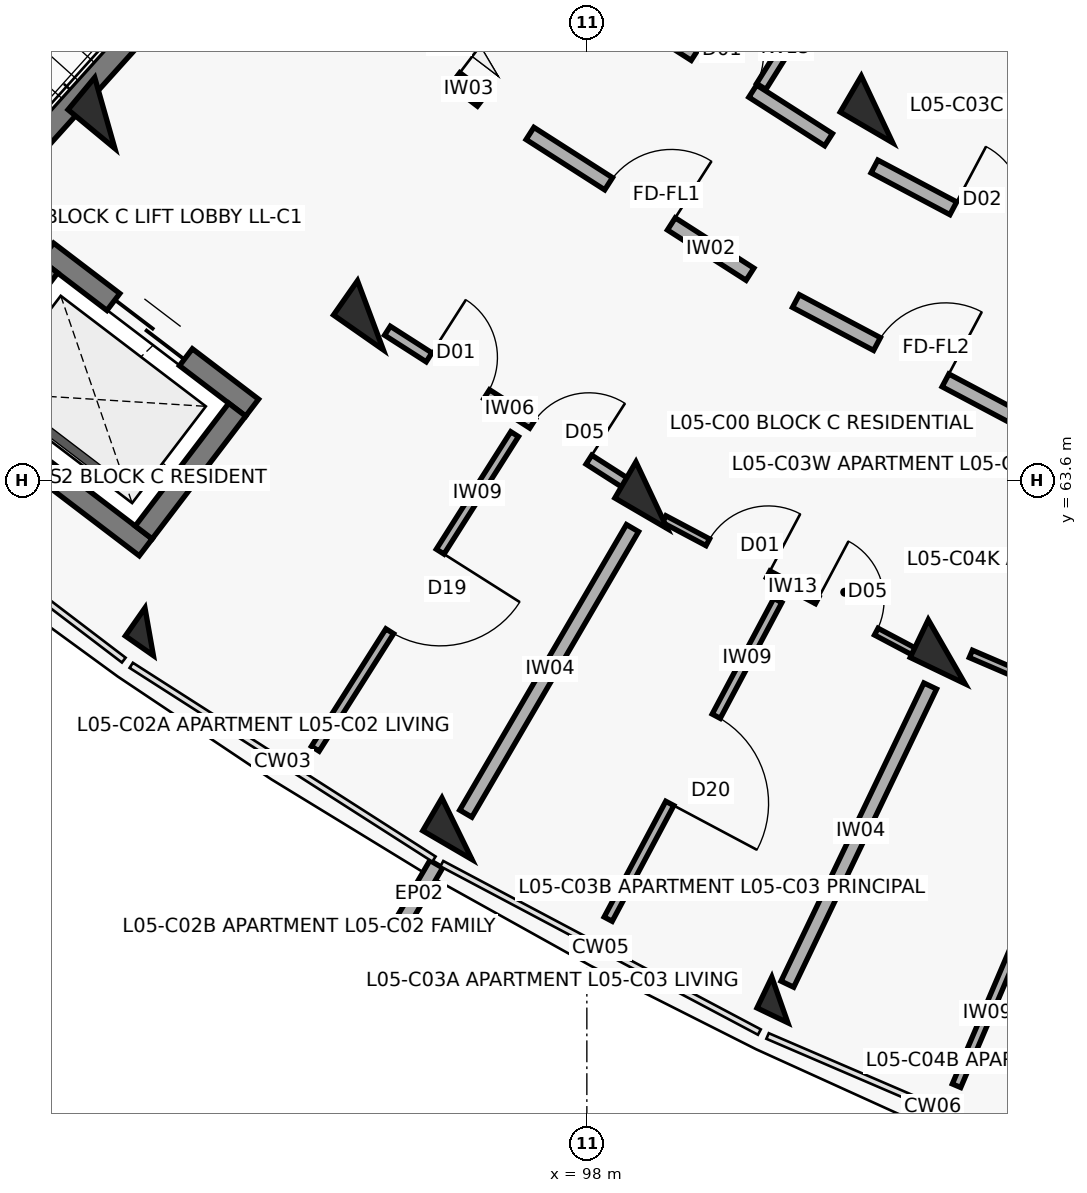
"""IFC4 building model, lengths in metres.
Left out: names, types, materials, properties, quantities, classifications, styles, units other than length and angle.
Written with IfcOpenShell. Run it as: python <this file> out.ifc"""

import sys

from ifc_helpers import new_model, si_unit, direction, frame, frame_2d, origin, origin_2d, place, context, subcontext, project, spatial, rectangle, extrude, element, fill, save


model = new_model("IFC4")
c1 = context("Model", 3, precision=1e-05, world=origin(), true_north=direction((0.0, 1.0)))
c2 = subcontext(c1, "Body", "Model", "MODEL_VIEW")
j1 = project(units=[si_unit("LENGTHUNIT", "METRE"), si_unit("PLANEANGLEUNIT", "RADIAN")], contexts=[c1])
p1 = place(None, origin())
s1 = spatial("IfcSite", under=j1, at=p1, CompositionType="ELEMENT")
p2 = place(p1, origin())
s2 = spatial("IfcBuilding", under=s1, at=p2, CompositionType="ELEMENT")
p3 = place(p2, frame((0.0, 0.0, 17.4)))
s3 = spatial("IfcBuildingStorey", under=s2, at=p3, CompositionType="ELEMENT", Elevation=17.4)
for number, where, z_axis, x_axis in (
    (1, (91.658, 68.43, 0.0), (0.0, 0.0, 1.0), (-0.638, -0.77, 0.0)),
    (2, (95.152, 65.768, 0.0), (0.0, 0.0, 1.0), (-0.573, -0.82, 0.0)),
):
    element("IfcColumn", number, at=place(p3, frame(where, z_axis=z_axis, x_axis=x_axis)), inside=s3, PredefinedType="COLUMN", context=c2, shape_type="SweptSolid", body=[
        extrude(rectangle(XDim=0.55, YDim=0.8, at=origin_2d()), origin(), (0.0, 0.0, 1.0), 3.1),
    ])
p4 = place(p3, frame((92.241, 61.605, 0.0), z_axis=(0.0, 0.0, 1.0), x_axis=(-0.573004420611, -0.819552276527, 0.0)))
e3 = element("IfcColumn", 3, at=p4, inside=s3, PredefinedType="COLUMN", context=c2, shape_type="SweptSolid", body=[
    extrude(rectangle(XDim=0.45, YDim=0.45, at=origin_2d()), origin(), (0.0, 0.0, 1.0), 3.1),
])
for number, where, z_axis, x_axis in (
    (4, (101.817, 68.478, 0.0), (0.0, 0.0, 1.0), (-0.504, -0.864, 0.0)),
    (5, (98.853, 63.4, 0.0), (0.0, 0.0, 1.0), (-0.504, -0.864, 0.0)),
):
    element("IfcColumn", number, at=place(p3, frame(where, z_axis=z_axis, x_axis=x_axis)), inside=s3, PredefinedType="COLUMN", context=c2, shape_type="SweptSolid", body=[
        extrude(rectangle(XDim=0.55, YDim=0.8, at=origin_2d()), origin(), (0.0, 0.0, 1.0), 3.1),
    ])
p5 = place(p3, frame((96.291, 59.013, 0.0), z_axis=(0.0, 0.0, 1.0), x_axis=(-0.504226211181, -0.863571611366, 0.0)))
e6 = element("IfcColumn", 6, at=p5, inside=s3, PredefinedType="COLUMN", context=c2, shape_type="SweptSolid", body=[
    extrude(rectangle(XDim=0.5, YDim=0.75, at=origin_2d()), origin(), (0.0, 0.0, 1.0), 3.1),
])
p6 = place(p3, frame((102.734, 61.341, 0.0), z_axis=(0.0, 0.0, 1.0), x_axis=(-0.432085748802, -0.901832526405, 0.0)))
e7 = element("IfcColumn", 7, at=p6, inside=s3, PredefinedType="COLUMN", context=c2, shape_type="SweptSolid", body=[
    extrude(rectangle(XDim=0.55, YDim=0.8, at=origin_2d()), origin(), (0.0, 0.0, 1.0), 3.1),
])
p7 = place(p3, frame((100.539, 56.76, 0.0), z_axis=(0.0, 0.0, 1.0), x_axis=(-0.432085748802, -0.901832526405, 0.0)))
e8 = element("IfcColumn", 8, at=p7, inside=s3, PredefinedType="COLUMN", context=c2, shape_type="SweptSolid", body=[
    extrude(rectangle(XDim=0.45, YDim=0.45, at=origin_2d()), origin(), (0.0, 0.0, 1.0), 3.1),
])
p8 = place(p3, frame((96.019, 58.547, 0.0), z_axis=(0.0, 0.0, 1.0), x_axis=(-0.504005947934, -0.863700182035, 0.0)))
e9 = element("IfcWall", 9, at=p8, inside=s3, PredefinedType="PARAPET", context=c2, shape_type="SweptSolid", body=[
    extrude(rectangle(XDim=0.9, YDim=0.195, at=frame_2d((0.45, 0.0))), origin(), (0.0, 0.0, 1.0), 2.25),
])
p9 = place(p3, frame((93.325, 70.899, 0.0), z_axis=(0.0, 0.0, 1.0), x_axis=(-0.668868253964, -0.743380964808, 0.0)))
e10 = element("IfcWall", 10, at=p9, inside=s3, PredefinedType="SHEAR", context=c2, shape_type="SweptSolid", body=[
    extrude(rectangle(XDim=7.69, YDim=0.3, at=frame_2d((3.845, 0.0))), origin(), (0.0, 0.0, 1.0), 3.1),
])
p10 = place(p3, frame((90.899, 66.607, 0.0), z_axis=(0.0, 0.0, 1.0), x_axis=(0.795439986025, -0.606032365994, 0.0)))
e11 = element("IfcWall", 11, at=p10, inside=s3, PredefinedType="SHEAR", context=c2, shape_type="SweptSolid", body=[
    extrude(rectangle(XDim=3.39, YDim=0.28, at=frame_2d((1.695, 0.0))), origin(), (0.0, 0.0, 1.0), 3.1),
])
p11 = place(p10, frame((1.095, 0.0, 0.0)))
e12 = element("IfcOpeningElement", 12, at=p11, cuts=e11, PredefinedType="OPENING", context=c2, shape_type="SweptSolid", body=[
    extrude(rectangle(XDim=1.2, YDim=2.15, at=frame_2d((0.6, 1.075))), frame((0.0, 0.15, 0.0), z_axis=(0.0, -1.0, 0.0), x_axis=(1.0, 0.0, 0.0)), (0.0, 0.0, 1.0), 0.3),
])
p12 = place(p3, frame((89.5, 64.77, 0.0), z_axis=(0.0, 0.0, 1.0), x_axis=(0.795474703455, -0.605986795371, 0.0)))
e13 = element("IfcWall", 13, at=p12, inside=s3, PredefinedType="SHEAR", context=c2, shape_type="SweptSolid", body=[
    extrude(rectangle(XDim=3.39, YDim=0.28, at=frame_2d((1.695, 0.0))), origin(), (0.0, 0.0, 1.0), 3.1),
])
p13 = place(p3, frame((90.926, 66.411, 0.0), z_axis=(0.0, 0.0, 1.0), x_axis=(-0.605948992168, -0.795503500238, 0.0)))
e14 = element("IfcWall", 14, at=p13, inside=s3, PredefinedType="SHEAR", context=c2, shape_type="SweptSolid", body=[
    extrude(rectangle(XDim=2.03, YDim=0.28, at=frame_2d((1.015, 0.0))), origin(), (0.0, 0.0, 1.0), 3.1),
])
p14 = place(p3, frame((93.4, 64.526, 0.0), z_axis=(0.0, 0.0, 1.0), x_axis=(-0.605891019062, -0.795547656033, 0.0)))
e15 = element("IfcWall", 15, at=p14, inside=s3, PredefinedType="SHEAR", context=c2, shape_type="SweptSolid", body=[
    extrude(rectangle(XDim=2.03, YDim=0.28, at=frame_2d((1.015, 0.0))), origin(), (0.0, 0.0, 1.0), 3.1),
])
p15 = place(p3, frame((94.001, 70.602, 0.0), z_axis=(0.0, 0.0, 1.0), x_axis=(0.795498026433, -0.605956178235, 0.0)))
e16 = element("IfcWall", 16, at=p15, inside=s3, PredefinedType="SOLIDWALL", context=c2, shape_type="SweptSolid", body=[
    extrude(rectangle(XDim=3.296, YDim=0.21, at=frame_2d((1.648, 0.0))), origin(), (0.0, 0.0, 1.0), 2.08),
])
p16 = place(p15, frame((0.45, 0.0, 0.0)))
e17 = element("IfcOpeningElement", 17, at=p16, cuts=e16, PredefinedType="OPENING", context=c2, shape_type="SweptSolid", body=[
    extrude(rectangle(XDim=1.1, YDim=2.15, at=frame_2d((0.55, 1.075))), frame((0.0, 0.115, 0.0), z_axis=(0.0, -1.0, 0.0), x_axis=(1.0, 0.0, 0.0)), (0.0, 0.0, 1.0), 0.23),
])
p17 = place(p15, frame((1.726, 0.0, 0.0)))
e18 = element("IfcOpeningElement", 18, at=p17, cuts=e16, PredefinedType="OPENING", context=c2, shape_type="SweptSolid", body=[
    extrude(rectangle(XDim=1.12, YDim=2.15, at=frame_2d((0.56, 1.075))), frame((0.0, 0.115, 0.0), z_axis=(0.0, -1.0, 0.0), x_axis=(1.0, 0.0, 0.0)), (0.0, 0.0, 1.0), 0.23),
])
p18 = place(p3, frame((97.252, 68.161, 0.0), z_axis=(0.0, 0.0, 1.0), x_axis=(0.842289466461, -0.53902546757, 0.0)))
e19 = element("IfcWall", 19, at=p18, inside=s3, PredefinedType="SOLIDWALL", context=c2, shape_type="SweptSolid", body=[
    extrude(rectangle(XDim=3.436, YDim=0.19, at=frame_2d((1.718, 0.0))), origin(), (0.0, 0.0, 1.0), 2.08),
])
p19 = place(p18, frame((1.228, 0.0, 0.0)))
e20 = element("IfcOpeningElement", 20, at=p19, cuts=e19, PredefinedType="OPENING", context=c2, shape_type="SweptSolid", body=[
    extrude(rectangle(XDim=0.98, YDim=2.15, at=frame_2d((0.49, 1.075))), frame((0.0, 0.105, 0.0), z_axis=(0.0, -1.0, 0.0), x_axis=(1.0, 0.0, 0.0)), (0.0, 0.0, 1.0), 0.21),
])
p20 = place(p3, frame((98.427, 69.841, 0.0), z_axis=(0.0, 0.0, 1.0), x_axis=(0.842280895761, -0.539038860043, 0.0)))
e21 = element("IfcWall", 21, at=p20, inside=s3, PredefinedType="SOLIDWALL", context=c2, shape_type="SweptSolid", body=[
    extrude(rectangle(XDim=3.269, YDim=0.19, at=frame_2d((1.634, 0.0))), origin(), (0.0, 0.0, 1.0), 2.08),
])
p21 = place(p20, frame((1.184, 0.0, 0.0)))
e22 = element("IfcOpeningElement", 22, at=p21, cuts=e21, PredefinedType="OPENING", context=c2, shape_type="SweptSolid", body=[
    extrude(rectangle(XDim=0.9, YDim=2.1, at=frame_2d((0.45, 1.05))), frame((0.0, 0.105, 0.0), z_axis=(0.0, -1.0, 0.0), x_axis=(1.0, 0.0, 0.0)), (0.0, 0.0, 1.0), 0.21),
])
p22 = place(p3, frame((102.044, 71.577, 0.0), z_axis=(0.0, 0.0, 1.0), x_axis=(-0.53015188203, -0.847902696057, 0.0)))
e23 = element("IfcWall", 23, at=p22, inside=s3, PredefinedType="PARTITIONING", context=c2, shape_type="SweptSolid", body=[
    extrude(rectangle(XDim=3.3, YDim=0.145, at=frame_2d((1.65, 0.0))), origin(), (0.0, 0.0, 1.0), 2.08),
])
p23 = place(p22, frame((1.21, 0.0, 0.0)))
e24 = element("IfcOpeningElement", 24, at=p23, cuts=e23, PredefinedType="OPENING", context=c2, shape_type="SweptSolid", body=[
    extrude(rectangle(XDim=0.88, YDim=2.1, at=frame_2d((0.44, 1.05))), frame((0.0, 0.083, 0.0), z_axis=(0.0, -1.0, 0.0), x_axis=(1.0, 0.0, 0.0)), (0.0, 0.0, 1.0), 0.165),
])
p24 = place(p3, frame((95.376, 65.565, 0.0), z_axis=(0.0, 0.0, 1.0), x_axis=(0.842242208372, -0.539099306656, 0.0)))
e25 = element("IfcWall", 25, at=p24, inside=s3, PredefinedType="PARTITIONING", context=c2, shape_type="SweptSolid", body=[
    extrude(rectangle(XDim=3.797, YDim=0.14, at=frame_2d((1.899, 0.0))), origin(), (0.0, 0.0, 1.0), 2.08),
])
p25 = place(p24, frame((0.65, 0.0, 0.0)))
e26 = element("IfcOpeningElement", 26, at=p25, cuts=e25, PredefinedType="OPENING", context=c2, shape_type="SweptSolid", body=[
    extrude(rectangle(XDim=0.9, YDim=2.1, at=frame_2d((0.45, 1.05))), frame((0.0, 0.08, 0.0), z_axis=(0.0, -1.0, 0.0), x_axis=(1.0, 0.0, 0.0)), (0.0, 0.0, 1.0), 0.16),
])
p26 = place(p24, frame((2.267, 0.0, 0.0)))
e27 = element("IfcOpeningElement", 27, at=p26, cuts=e25, PredefinedType="OPENING", context=c2, shape_type="SweptSolid", body=[
    extrude(rectangle(XDim=0.88, YDim=2.1, at=frame_2d((0.44, 1.05))), frame((0.0, 0.08, 0.0), z_axis=(0.0, -1.0, 0.0), x_axis=(1.0, 0.0, 0.0)), (0.0, 0.0, 1.0), 0.16),
])
p27 = place(p3, frame((97.05, 64.204, 0.0), z_axis=(0.0, 0.0, 1.0), x_axis=(-0.535246458955, -0.844695938297, 0.0)))
e28 = element("IfcWall", 28, at=p27, inside=s3, PredefinedType="PARTITIONING", context=c2, shape_type="SweptSolid", body=[
    extrude(rectangle(XDim=4.9, YDim=0.12, at=frame_2d((2.45, 0.0))), origin(), (0.0, 0.0, 1.0), 2.08),
])
p28 = place(p27, frame((1.83, 0.0, 0.0)))
e29 = element("IfcOpeningElement", 29, at=p28, cuts=e28, PredefinedType="OPENING", context=c2, shape_type="SweptSolid", body=[
    extrude(rectangle(XDim=1.24, YDim=2.1, at=frame_2d((0.62, 1.05))), frame((0.0, 0.07, 0.0), z_axis=(0.0, -1.0, 0.0), x_axis=(1.0, 0.0, 0.0)), (0.0, 0.0, 1.0), 0.14),
])
p29 = place(p3, frame((100.75, 65.956, 0.0), z_axis=(0.0, 0.0, 1.0), x_axis=(0.883440266101, -0.468543803963, 0.0)))
e30 = element("IfcWall", 30, at=p29, inside=s3, PredefinedType="SOLIDWALL", context=c2, shape_type="SweptSolid", body=[
    extrude(rectangle(XDim=3.436, YDim=0.19, at=frame_2d((1.718, 0.0))), origin(), (0.0, 0.0, 1.0), 2.08),
])
p30 = place(p29, frame((1.208, 0.0, 0.0)))
e31 = element("IfcOpeningElement", 31, at=p30, cuts=e30, PredefinedType="OPENING", context=c2, shape_type="SweptSolid", body=[
    extrude(rectangle(XDim=1.02, YDim=2.15, at=frame_2d((0.51, 1.075))), frame((0.0, 0.105, 0.0), z_axis=(0.0, -1.0, 0.0), x_axis=(1.0, 0.0, 0.0)), (0.0, 0.0, 1.0), 0.21),
])
p31 = place(p3, frame((101.784, 67.726, 0.0), z_axis=(0.0, 0.0, 1.0), x_axis=(0.883444301944, -0.468536194293, 0.0)))
e32 = element("IfcWall", 32, at=p31, inside=s3, PredefinedType="SOLIDWALL", context=c2, shape_type="SweptSolid", body=[
    extrude(rectangle(XDim=3.269, YDim=0.19, at=frame_2d((1.634, 0.0))), origin(), (0.0, 0.0, 1.0), 2.08),
])
p32 = place(p31, frame((1.174, 0.0, 0.0)))
e33 = element("IfcOpeningElement", 33, at=p32, cuts=e32, PredefinedType="OPENING", context=c2, shape_type="SweptSolid", body=[
    extrude(rectangle(XDim=0.92, YDim=2.1, at=frame_2d((0.46, 1.05))), frame((0.0, 0.105, 0.0), z_axis=(0.0, -1.0, 0.0), x_axis=(1.0, 0.0, 0.0)), (0.0, 0.0, 1.0), 0.21),
])
p33 = place(p3, frame((99.017, 63.087, 0.0), z_axis=(0.0, 0.0, 1.0), x_axis=(0.883415075746, -0.468591297342, 0.0)))
e34 = element("IfcWall", 34, at=p33, inside=s3, PredefinedType="PARTITIONING", context=c2, shape_type="SweptSolid", body=[
    extrude(rectangle(XDim=3.81, YDim=0.1, at=frame_2d((1.905, 0.0))), origin(), (0.0, 0.0, 1.0), 2.08),
])
p34 = place(p33, frame((0.65, 0.0, 0.0)))
e35 = element("IfcOpeningElement", 35, at=p34, cuts=e34, PredefinedType="OPENING", context=c2, shape_type="SweptSolid", body=[
    extrude(rectangle(XDim=0.9, YDim=2.1, at=frame_2d((0.45, 1.05))), frame((0.0, 0.06, 0.0), z_axis=(0.0, -1.0, 0.0), x_axis=(1.0, 0.0, 0.0)), (0.0, 0.0, 1.0), 0.12),
])
p35 = place(p33, frame((2.28, 0.0, 0.0)))
e36 = element("IfcOpeningElement", 36, at=p35, cuts=e34, PredefinedType="OPENING", context=c2, shape_type="SweptSolid", body=[
    extrude(rectangle(XDim=0.88, YDim=2.1, at=frame_2d((0.44, 1.05))), frame((0.0, 0.06, 0.0), z_axis=(0.0, -1.0, 0.0), x_axis=(1.0, 0.0, 0.0)), (0.0, 0.0, 1.0), 0.12),
])
p36 = place(p3, frame((100.513, 62.016, 0.0), z_axis=(0.0, 0.0, 1.0), x_axis=(-0.469889133168, -0.882725440061, 0.0)))
e37 = element("IfcWall", 37, at=p36, inside=s3, PredefinedType="PARTITIONING", context=c2, shape_type="SweptSolid", body=[
    extrude(rectangle(XDim=4.75, YDim=0.12, at=frame_2d((2.375, 0.0))), origin(), (0.0, 0.0, 1.0), 2.08),
])
p37 = place(p36, frame((1.725, 0.0, 0.0)))
e38 = element("IfcOpeningElement", 38, at=p37, cuts=e37, PredefinedType="OPENING", context=c2, shape_type="SweptSolid", body=[
    extrude(rectangle(XDim=1.3, YDim=2.1, at=frame_2d((0.65, 1.05))), frame((0.0, 0.07, 0.0), z_axis=(0.0, -1.0, 0.0), x_axis=(1.0, 0.0, 0.0)), (0.0, 0.0, 1.0), 0.14),
])
p38 = place(p3, frame((98.601, 62.968, 0.0), z_axis=(0.0, 0.0, 1.0), x_axis=(-0.504216452091, -0.863577309475, 0.0)))
e39 = element("IfcWall", 39, at=p38, inside=s3, PredefinedType="SOLIDWALL", context=c2, shape_type="SweptSolid", body=[
    extrude(rectangle(XDim=4.35, YDim=0.185, at=frame_2d((2.175, 0.0))), origin(), (0.0, 0.0, 1.0), 2.08),
])
p39 = place(p3, frame((103.052, 61.313, 0.0), z_axis=(0.0, 0.0, 1.0), x_axis=(0.918714121981, -0.39492323567, 0.0)))
e40 = element("IfcWall", 40, at=p39, inside=s3, PredefinedType="PARTITIONING", context=c2, shape_type="SweptSolid", body=[
    extrude(rectangle(XDim=3.785, YDim=0.105, at=frame_2d((1.893, 0.0))), origin(), (0.0, 0.0, 1.0), 2.08),
])
p40 = place(p39, frame((0.65, 0.0, 0.0)))
e41 = element("IfcOpeningElement", 41, at=p40, cuts=e40, PredefinedType="OPENING", context=c2, shape_type="SweptSolid", body=[
    extrude(rectangle(XDim=0.9, YDim=2.1, at=frame_2d((0.45, 1.05))), frame((0.0, 0.062, 0.0), z_axis=(0.0, -1.0, 0.0), x_axis=(1.0, 0.0, 0.0)), (0.0, 0.0, 1.0), 0.125),
])
p41 = place(p39, frame((2.255, 0.0, 0.0)))
e42 = element("IfcOpeningElement", 42, at=p41, cuts=e40, PredefinedType="OPENING", context=c2, shape_type="SweptSolid", body=[
    extrude(rectangle(XDim=0.88, YDim=2.1, at=frame_2d((0.44, 1.05))), frame((0.0, 0.062, 0.0), z_axis=(0.0, -1.0, 0.0), x_axis=(1.0, 0.0, 0.0)), (0.0, 0.0, 1.0), 0.125),
])
p42 = place(p3, frame((104.844, 60.277, 0.0), z_axis=(0.0, 0.0, 1.0), x_axis=(-0.392127280422, -0.919910971751, 0.0)))
e43 = element("IfcWall", 43, at=p42, inside=s3, PredefinedType="PARTITIONING", context=c2, shape_type="SweptSolid", body=[
    extrude(rectangle(XDim=5.05, YDim=0.12, at=frame_2d((2.525, 0.0))), origin(), (0.0, 0.0, 1.0), 2.08),
])
p43 = place(p42, frame((2.075, 0.0, 0.0)))
e44 = element("IfcOpeningElement", 44, at=p43, cuts=e43, PredefinedType="OPENING", context=c2, shape_type="SweptSolid", body=[
    extrude(rectangle(XDim=0.9, YDim=2.1, at=frame_2d((0.45, 1.05))), frame((0.0, 0.07, 0.0), z_axis=(0.0, -1.0, 0.0), x_axis=(1.0, 0.0, 0.0)), (0.0, 0.0, 1.0), 0.14),
])
p44 = place(p3, frame((102.518, 60.89, 0.0), z_axis=(0.0, 0.0, 1.0), x_axis=(-0.432108769108, -0.901821496561, 0.0)))
e45 = element("IfcWall", 45, at=p44, inside=s3, PredefinedType="SOLIDWALL", context=c2, shape_type="SweptSolid", body=[
    extrude(rectangle(XDim=4.35, YDim=0.185, at=frame_2d((2.175, 0.0))), origin(), (0.0, 0.0, 1.0), 2.08),
])
p45 = place(p11, origin())
e46 = element("IfcDoor", 46, at=p45, inside=s3, OperationType="DOUBLE_DOOR_SLIDING", PredefinedType="DOOR", context=c2, shape_type="SweptSolid", body=[
    extrude(rectangle(XDim=1.2, YDim=2.15, at=frame_2d((0.6, 1.075))), frame((0.0, 0.025, 0.0), z_axis=(0.0, -1.0, 0.0), x_axis=(1.0, 0.0, 0.0)), (0.0, 0.0, 1.0), 0.05),
])
fill(e12, e46)
p46 = place(p17, origin())
e47 = element("IfcDoor", 47, at=p46, inside=s3, OperationType="SINGLE_SWING_RIGHT", PredefinedType="DOOR", context=c2, shape_type="SweptSolid", body=[
    extrude(rectangle(XDim=1.12, YDim=2.15, at=frame_2d((0.56, 1.075))), frame((0.0, 0.025, 0.0), z_axis=(0.0, -1.0, 0.0), x_axis=(1.0, 0.0, 0.0)), (0.0, 0.0, 1.0), 0.05),
])
fill(e18, e47)
p47 = place(p19, origin())
e48 = element("IfcDoor", 48, at=p47, inside=s3, OperationType="SINGLE_SWING_RIGHT", PredefinedType="DOOR", context=c2, shape_type="SweptSolid", body=[
    extrude(rectangle(XDim=0.98, YDim=2.15, at=frame_2d((0.49, 1.075))), frame((0.0, 0.025, 0.0), z_axis=(0.0, -1.0, 0.0), x_axis=(1.0, 0.0, 0.0)), (0.0, 0.0, 1.0), 0.05),
])
fill(e20, e48)
p48 = place(p21, origin())
e49 = element("IfcDoor", 49, at=p48, inside=s3, OperationType="SINGLE_SWING_LEFT", PredefinedType="DOOR", context=c2, shape_type="SweptSolid", body=[
    extrude(rectangle(XDim=0.9, YDim=2.1, at=frame_2d((0.45, 1.05))), frame((0.0, 0.025, 0.0), z_axis=(0.0, -1.0, 0.0), x_axis=(1.0, 0.0, 0.0)), (0.0, 0.0, 1.0), 0.05),
])
fill(e22, e49)
p49 = place(p25, origin())
e50 = element("IfcDoor", 50, at=p49, inside=s3, OperationType="SINGLE_SWING_LEFT", PredefinedType="DOOR", context=c2, shape_type="SweptSolid", body=[
    extrude(rectangle(XDim=0.9, YDim=2.1, at=frame_2d((0.45, 1.05))), frame((0.0, 0.025, 0.0), z_axis=(0.0, -1.0, 0.0), x_axis=(1.0, 0.0, 0.0)), (0.0, 0.0, 1.0), 0.05),
])
fill(e26, e50)
p50 = place(p26, origin())
e51 = element("IfcDoor", 51, at=p50, inside=s3, OperationType="SINGLE_SWING_RIGHT", PredefinedType="DOOR", context=c2, shape_type="SweptSolid", body=[
    extrude(rectangle(XDim=0.88, YDim=2.1, at=frame_2d((0.44, 1.05))), frame((0.0, 0.025, 0.0), z_axis=(0.0, -1.0, 0.0), x_axis=(1.0, 0.0, 0.0)), (0.0, 0.0, 1.0), 0.05),
])
fill(e27, e51)
p51 = place(p28, origin())
e52 = element("IfcDoor", 52, at=p51, inside=s3, OperationType="SINGLE_SWING_LEFT", PredefinedType="DOOR", context=c2, shape_type="SweptSolid", body=[
    extrude(rectangle(XDim=1.24, YDim=2.1, at=frame_2d((0.62, 1.05))), frame((0.0, 0.025, 0.0), z_axis=(0.0, -1.0, 0.0), x_axis=(1.0, 0.0, 0.0)), (0.0, 0.0, 1.0), 0.05),
])
fill(e29, e52)
p52 = place(p30, origin())
e53 = element("IfcDoor", 53, at=p52, inside=s3, OperationType="SINGLE_SWING_RIGHT", PredefinedType="DOOR", context=c2, shape_type="SweptSolid", body=[
    extrude(rectangle(XDim=1.02, YDim=2.15, at=frame_2d((0.51, 1.075))), frame((0.0, 0.025, 0.0), z_axis=(0.0, -1.0, 0.0), x_axis=(1.0, 0.0, 0.0)), (0.0, 0.0, 1.0), 0.05),
])
fill(e31, e53)
p53 = place(p32, origin())
e54 = element("IfcDoor", 54, at=p53, inside=s3, OperationType="SINGLE_SWING_LEFT", PredefinedType="DOOR", context=c2, shape_type="SweptSolid", body=[
    extrude(rectangle(XDim=0.92, YDim=2.1, at=frame_2d((0.46, 1.05))), frame((0.0, 0.025, 0.0), z_axis=(0.0, -1.0, 0.0), x_axis=(1.0, 0.0, 0.0)), (0.0, 0.0, 1.0), 0.05),
])
fill(e33, e54)
p54 = place(p34, origin())
e55 = element("IfcDoor", 55, at=p54, inside=s3, OperationType="SINGLE_SWING_RIGHT", PredefinedType="DOOR", context=c2, shape_type="SweptSolid", body=[
    extrude(rectangle(XDim=0.9, YDim=2.1, at=frame_2d((0.45, 1.05))), frame((0.0, 0.025, 0.0), z_axis=(0.0, -1.0, 0.0), x_axis=(1.0, 0.0, 0.0)), (0.0, 0.0, 1.0), 0.05),
])
fill(e35, e55)
p55 = place(p35, origin())
e56 = element("IfcDoor", 56, at=p55, inside=s3, OperationType="SINGLE_SWING_LEFT", PredefinedType="DOOR", context=c2, shape_type="SweptSolid", body=[
    extrude(rectangle(XDim=0.88, YDim=2.1, at=frame_2d((0.44, 1.05))), frame((0.0, 0.025, 0.0), z_axis=(0.0, -1.0, 0.0), x_axis=(1.0, 0.0, 0.0)), (0.0, 0.0, 1.0), 0.05),
])
fill(e36, e56)
p56 = place(p37, origin())
e57 = element("IfcDoor", 57, at=p56, inside=s3, OperationType="SINGLE_SWING_RIGHT", PredefinedType="DOOR", context=c2, shape_type="SweptSolid", body=[
    extrude(rectangle(XDim=1.3, YDim=2.1, at=frame_2d((0.65, 1.05))), frame((0.0, 0.025, 0.0), z_axis=(0.0, -1.0, 0.0), x_axis=(1.0, 0.0, 0.0)), (0.0, 0.0, 1.0), 0.05),
])
fill(e38, e57)
save(model, sys.argv[1])
